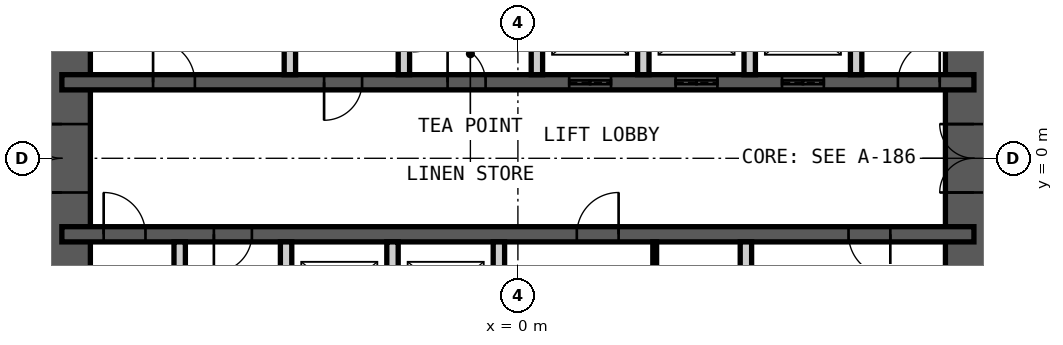
"""IFC4 building model, lengths in metres.
Left out: names, types, materials, properties, quantities, classifications, styles, units other than length and angle.
Written with IfcOpenShell. Run it as: python <this file> out.ifc"""

import sys

from ifc_helpers import new_model, si_unit, direction, frame, frame_2d, origin, place, context, subcontext, project, spatial, rectangle, extrude, element, fill, save


model = new_model("IFC4")
c1 = context("Model", 3, precision=1e-05, world=origin(), true_north=direction((0.0, 1.0)))
c2 = subcontext(c1, "Body", "Model", "MODEL_VIEW")
j1 = project(units=[si_unit("LENGTHUNIT", "METRE"), si_unit("PLANEANGLEUNIT", "RADIAN")], contexts=[c1])
p1 = place(None, origin())
s1 = spatial("IfcSite", under=j1, at=p1, CompositionType="ELEMENT")
p2 = place(p1, origin())
s2 = spatial("IfcBuilding", under=s1, at=p2, CompositionType="ELEMENT")
p3 = place(p2, frame((0.0, 0.0, 124.0)))
s3 = spatial("IfcBuildingStorey", under=s2, at=p3, CompositionType="ELEMENT", Elevation=124.0)
p4 = place(p3, frame((12.0, -9.0, 0.0), z_axis=(0.0, 0.0, 1.0), x_axis=(0.0, 1.0, 0.0)))
e1 = element("IfcWall", 1, at=p4, inside=s3, PredefinedType="SHEAR", context=c2, shape_type="SweptSolid", body=[
    extrude(rectangle(XDim=18.0, YDim=1.5, at=frame_2d((9.0, 0.0))), origin(), (0.0, 0.0, 1.0), 4.2),
])
p5 = place(p4, frame((8.1, 0.0, 0.0)))
e2 = element("IfcOpeningElement", 2, at=p5, cuts=e1, PredefinedType="OPENING", context=c2, shape_type="SweptSolid", body=[
    extrude(rectangle(XDim=1.8, YDim=2.1, at=frame_2d((0.9, 1.05))), frame((0.0, 0.76, 0.0), z_axis=(0.0, -1.0, 0.0), x_axis=(1.0, 0.0, 0.0)), (0.0, 0.0, 1.0), 1.52),
])
p6 = place(p3, frame((-12.0, -9.0, 0.0), z_axis=(0.0, 0.0, 1.0), x_axis=(0.0, 1.0, 0.0)))
e3 = element("IfcWall", 3, at=p6, inside=s3, PredefinedType="SHEAR", context=c2, shape_type="SweptSolid", body=[
    extrude(rectangle(XDim=18.0, YDim=1.5, at=frame_2d((9.0, 0.0))), origin(), (0.0, 0.0, 1.0), 4.2),
])
p7 = place(p6, frame((8.1, 0.0, 0.0)))
e4 = element("IfcOpeningElement", 4, at=p7, cuts=e3, PredefinedType="OPENING", context=c2, shape_type="SweptSolid", body=[
    extrude(rectangle(XDim=1.8, YDim=2.1, at=frame_2d((0.9, 1.05))), frame((0.0, 0.76, 0.0), z_axis=(0.0, -1.0, 0.0), x_axis=(1.0, 0.0, 0.0)), (0.0, 0.0, 1.0), 1.52),
])
p8 = place(p3, frame((-12.0, 2.0, 0.0), z_axis=(0.0, 0.0, 1.0), x_axis=(1.0, 0.0, 0.0)))
e5 = element("IfcWall", 5, at=p8, inside=s3, PredefinedType="SHEAR", context=c2, shape_type="SweptSolid", body=[
    extrude(rectangle(XDim=24.0, YDim=0.4, at=frame_2d((12.0, 0.0))), origin(), (0.0, 0.0, 1.0), 4.2),
])
p9 = place(p8, frame((2.4, 0.0, 0.0)))
e6 = element("IfcOpeningElement", 6, at=p9, cuts=e5, PredefinedType="OPENING", context=c2, shape_type="SweptSolid", body=[
    extrude(rectangle(XDim=1.1, YDim=2.1, at=frame_2d((0.55, 1.05))), frame((0.0, 0.21, 0.0), z_axis=(0.0, -1.0, 0.0), x_axis=(1.0, 0.0, 0.0)), (0.0, 0.0, 1.0), 0.42),
])
p10 = place(p8, frame((22.0, 0.0, 0.0)))
e7 = element("IfcOpeningElement", 7, at=p10, cuts=e5, PredefinedType="OPENING", context=c2, shape_type="SweptSolid", body=[
    extrude(rectangle(XDim=1.1, YDim=2.1, at=frame_2d((0.55, 1.05))), frame((0.0, 0.21, 0.0), z_axis=(0.0, -1.0, 0.0), x_axis=(1.0, 0.0, 0.0)), (0.0, 0.0, 1.0), 0.42),
])
p11 = place(p8, frame((10.15, 0.0, 0.0)))
e8 = element("IfcOpeningElement", 8, at=p11, cuts=e5, PredefinedType="OPENING", context=c2, shape_type="SweptSolid", body=[
    extrude(rectangle(XDim=1.0, YDim=2.1, at=frame_2d((0.5, 1.05))), frame((0.0, 0.21, 0.0), z_axis=(0.0, -1.0, 0.0), x_axis=(1.0, 0.0, 0.0)), (0.0, 0.0, 1.0), 0.42),
])
p12 = place(p8, frame((6.9, 0.0, 0.0)))
e9 = element("IfcOpeningElement", 9, at=p12, cuts=e5, PredefinedType="OPENING", context=c2, shape_type="SweptSolid", body=[
    extrude(rectangle(XDim=1.0, YDim=2.1, at=frame_2d((0.5, 1.05))), frame((0.0, 0.21, 0.0), z_axis=(0.0, -1.0, 0.0), x_axis=(1.0, 0.0, 0.0)), (0.0, 0.0, 1.0), 0.42),
])
p13 = place(p8, frame((13.35, 0.0, 0.0)))
e10 = element("IfcOpeningElement", 10, at=p13, cuts=e5, PredefinedType="OPENING", context=c2, shape_type="SweptSolid", body=[
    extrude(rectangle(XDim=1.1, YDim=2.4, at=frame_2d((0.55, 1.2))), frame((0.0, 0.21, 0.0), z_axis=(0.0, -1.0, 0.0), x_axis=(1.0, 0.0, 0.0)), (0.0, 0.0, 1.0), 0.42),
])
p14 = place(p8, frame((16.15, 0.0, 0.0)))
e11 = element("IfcOpeningElement", 11, at=p14, cuts=e5, PredefinedType="OPENING", context=c2, shape_type="SweptSolid", body=[
    extrude(rectangle(XDim=1.1, YDim=2.4, at=frame_2d((0.55, 1.2))), frame((0.0, 0.21, 0.0), z_axis=(0.0, -1.0, 0.0), x_axis=(1.0, 0.0, 0.0)), (0.0, 0.0, 1.0), 0.42),
])
p15 = place(p8, frame((18.95, 0.0, 0.0)))
e12 = element("IfcOpeningElement", 12, at=p15, cuts=e5, PredefinedType="OPENING", context=c2, shape_type="SweptSolid", body=[
    extrude(rectangle(XDim=1.1, YDim=2.4, at=frame_2d((0.55, 1.2))), frame((0.0, 0.21, 0.0), z_axis=(0.0, -1.0, 0.0), x_axis=(1.0, 0.0, 0.0)), (0.0, 0.0, 1.0), 0.42),
])
p16 = place(p3, frame((-12.0, -2.0, 0.0), z_axis=(0.0, 0.0, 1.0), x_axis=(1.0, 0.0, 0.0)))
e13 = element("IfcWall", 13, at=p16, inside=s3, PredefinedType="SHEAR", context=c2, shape_type="SweptSolid", body=[
    extrude(rectangle(XDim=24.0, YDim=0.4, at=frame_2d((12.0, 0.0))), origin(), (0.0, 0.0, 1.0), 4.2),
])
p17 = place(p16, frame((1.1, 0.0, 0.0)))
e14 = element("IfcOpeningElement", 14, at=p17, cuts=e13, PredefinedType="OPENING", context=c2, shape_type="SweptSolid", body=[
    extrude(rectangle(XDim=1.1, YDim=2.1, at=frame_2d((0.55, 1.05))), frame((0.0, 0.21, 0.0), z_axis=(0.0, -1.0, 0.0), x_axis=(1.0, 0.0, 0.0)), (0.0, 0.0, 1.0), 0.42),
])
p18 = place(p16, frame((13.55, 0.0, 0.0)))
e15 = element("IfcOpeningElement", 15, at=p18, cuts=e13, PredefinedType="OPENING", context=c2, shape_type="SweptSolid", body=[
    extrude(rectangle(XDim=1.1, YDim=2.1, at=frame_2d((0.55, 1.05))), frame((0.0, 0.21, 0.0), z_axis=(0.0, -1.0, 0.0), x_axis=(1.0, 0.0, 0.0)), (0.0, 0.0, 1.0), 0.42),
])
p19 = place(p16, frame((20.7, 0.0, 0.0)))
e16 = element("IfcOpeningElement", 16, at=p19, cuts=e13, PredefinedType="OPENING", context=c2, shape_type="SweptSolid", body=[
    extrude(rectangle(XDim=1.1, YDim=2.1, at=frame_2d((0.55, 1.05))), frame((0.0, 0.21, 0.0), z_axis=(0.0, -1.0, 0.0), x_axis=(1.0, 0.0, 0.0)), (0.0, 0.0, 1.0), 0.42),
])
p20 = place(p16, frame((4.0, 0.0, 0.0)))
e17 = element("IfcOpeningElement", 17, at=p20, cuts=e13, PredefinedType="OPENING", context=c2, shape_type="SweptSolid", body=[
    extrude(rectangle(XDim=1.0, YDim=2.1, at=frame_2d((0.5, 1.05))), frame((0.0, 0.21, 0.0), z_axis=(0.0, -1.0, 0.0), x_axis=(1.0, 0.0, 0.0)), (0.0, 0.0, 1.0), 0.42),
])
for number, where, z_axis, x_axis in (
    (18, (-6.0, 2.2, 0.0), (0.0, 0.0, 1.0), (0.0, 1.0, 0.0)),
    (19, (-3.0, 2.2, 0.0), (0.0, 0.0, 1.0), (0.0, 1.0, 0.0)),
    (20, (0.5, 2.2, 0.0), (0.0, 0.0, 1.0), (0.0, 1.0, 0.0)),
    (21, (3.3, 2.2, 0.0), (0.0, 0.0, 1.0), (0.0, 1.0, 0.0)),
    (22, (6.1, 2.2, 0.0), (0.0, 0.0, 1.0), (0.0, 1.0, 0.0)),
    (23, (8.9, 2.2, 0.0), (0.0, 0.0, 1.0), (0.0, 1.0, 0.0)),
    (24, (-8.9, -4.85, 0.0), (0.0, 0.0, 1.0), (0.0, 1.0, 0.0)),
    (25, (-6.1, -4.85, 0.0), (0.0, 0.0, 1.0), (0.0, 1.0, 0.0)),
    (26, (-3.3, -4.85, 0.0), (0.0, 0.0, 1.0), (0.0, 1.0, 0.0)),
    (27, (-0.5, -4.85, 0.0), (0.0, 0.0, 1.0), (0.0, 1.0, 0.0)),
    (28, (6.0, -4.85, 0.0), (0.0, 0.0, 1.0), (0.0, 1.0, 0.0)),
):
    element("IfcWall", number, at=place(p3, frame(where, z_axis=z_axis, x_axis=x_axis)), inside=s3, PredefinedType="PARTITIONING", context=c2, shape_type="SweptSolid", body=[
        extrude(rectangle(XDim=2.65, YDim=0.3, at=frame_2d((1.325, 0.0))), origin(), (0.0, 0.0, 1.0), 3.98),
    ])
p21 = place(p3, frame((3.6, -4.85, 0.0), z_axis=(0.0, 0.0, 1.0), x_axis=(0.0, 1.0, 0.0)))
e29 = element("IfcWall", 29, at=p21, inside=s3, PredefinedType="PARTITIONING", context=c2, shape_type="SweptSolid", body=[
    extrude(rectangle(XDim=2.65, YDim=0.1, at=frame_2d((1.325, 0.0))), origin(), (0.0, 0.0, 1.0), 3.98),
])
p22 = place(p21, frame((0.1, 0.0, 0.0)))
e30 = element("IfcOpeningElement", 30, at=p22, cuts=e29, PredefinedType="OPENING", context=c2, shape_type="SweptSolid", body=[
    extrude(rectangle(XDim=1.0, YDim=2.4, at=frame_2d((0.5, 1.2))), frame((0.0, 0.06, 0.0), z_axis=(0.0, -1.0, 0.0), x_axis=(1.0, 0.0, 0.0)), (0.0, 0.0, 1.0), 0.12),
])
p23 = place(p9, origin())
e31 = element("IfcDoor", 31, at=p23, inside=s3, OperationType="SINGLE_SWING_RIGHT", PredefinedType="DOOR", context=c2, shape_type="SweptSolid", body=[
    extrude(rectangle(XDim=1.1, YDim=2.1, at=frame_2d((0.55, 1.05))), frame((0.0, 0.025, 0.0), z_axis=(0.0, -1.0, 0.0), x_axis=(1.0, 0.0, 0.0)), (0.0, 0.0, 1.0), 0.05),
])
fill(e6, e31)
p24 = place(p17, origin())
e32 = element("IfcDoor", 32, at=p24, inside=s3, OperationType="SINGLE_SWING_RIGHT", PredefinedType="DOOR", context=c2, shape_type="SweptSolid", body=[
    extrude(rectangle(XDim=1.1, YDim=2.1, at=frame_2d((0.55, 1.05))), frame((0.0, 0.025, 0.0), z_axis=(0.0, -1.0, 0.0), x_axis=(1.0, 0.0, 0.0)), (0.0, 0.0, 1.0), 0.05),
])
fill(e14, e32)
p25 = place(p10, origin())
e33 = element("IfcDoor", 33, at=p25, inside=s3, OperationType="SINGLE_SWING_LEFT", PredefinedType="DOOR", context=c2, shape_type="SweptSolid", body=[
    extrude(rectangle(XDim=1.1, YDim=2.1, at=frame_2d((0.55, 1.05))), frame((0.0, 0.025, 0.0), z_axis=(0.0, -1.0, 0.0), x_axis=(1.0, 0.0, 0.0)), (0.0, 0.0, 1.0), 0.05),
])
fill(e7, e33)
p26 = place(p11, origin())
e34 = element("IfcDoor", 34, at=p26, inside=s3, OperationType="SINGLE_SWING_RIGHT", PredefinedType="DOOR", context=c2, shape_type="SweptSolid", body=[
    extrude(rectangle(XDim=1.0, YDim=2.1, at=frame_2d((0.5, 1.05))), frame((0.0, 0.025, 0.0), z_axis=(0.0, -1.0, 0.0), x_axis=(1.0, 0.0, 0.0)), (0.0, 0.0, 1.0), 0.05),
])
fill(e8, e34)
p27 = place(p18, origin())
e35 = element("IfcDoor", 35, at=p27, inside=s3, OperationType="SINGLE_SWING_LEFT", PredefinedType="DOOR", context=c2, shape_type="SweptSolid", body=[
    extrude(rectangle(XDim=1.1, YDim=2.1, at=frame_2d((0.55, 1.05))), frame((0.0, 0.025, 0.0), z_axis=(0.0, -1.0, 0.0), x_axis=(1.0, 0.0, 0.0)), (0.0, 0.0, 1.0), 0.05),
])
fill(e15, e35)
p28 = place(p19, origin())
e36 = element("IfcDoor", 36, at=p28, inside=s3, OperationType="SINGLE_SWING_RIGHT", PredefinedType="DOOR", context=c2, shape_type="SweptSolid", body=[
    extrude(rectangle(XDim=1.1, YDim=2.1, at=frame_2d((0.55, 1.05))), frame((0.0, 0.025, 0.0), z_axis=(0.0, -1.0, 0.0), x_axis=(1.0, 0.0, 0.0)), (0.0, 0.0, 1.0), 0.05),
])
fill(e16, e36)
p29 = place(p5, origin())
e37 = element("IfcDoor", 37, at=p29, inside=s3, OperationType="DOUBLE_DOOR_DOUBLE_SWING", PredefinedType="DOOR", context=c2, shape_type="SweptSolid", body=[
    extrude(rectangle(XDim=1.8, YDim=2.1, at=frame_2d((0.9, 1.05))), frame((0.0, 0.025, 0.0), z_axis=(0.0, -1.0, 0.0), x_axis=(1.0, 0.0, 0.0)), (0.0, 0.0, 1.0), 0.05),
])
fill(e2, e37)
p30 = place(p7, origin())
e38 = element("IfcDoor", 38, at=p30, inside=s3, OperationType="DOUBLE_DOOR_DOUBLE_SWING", PredefinedType="DOOR", context=c2, shape_type="SweptSolid", body=[
    extrude(rectangle(XDim=1.8, YDim=2.1, at=frame_2d((0.9, 1.05))), frame((0.0, 0.025, 0.0), z_axis=(0.0, -1.0, 0.0), x_axis=(1.0, 0.0, 0.0)), (0.0, 0.0, 1.0), 0.05),
])
fill(e4, e38)
p31 = place(p12, origin())
e39 = element("IfcDoor", 39, at=p31, inside=s3, OperationType="SINGLE_SWING_LEFT", PredefinedType="DOOR", context=c2, shape_type="SweptSolid", body=[
    extrude(rectangle(XDim=1.0, YDim=2.1, at=frame_2d((0.5, 1.05))), frame((0.0, 0.025, 0.0), z_axis=(0.0, -1.0, 0.0), x_axis=(1.0, 0.0, 0.0)), (0.0, 0.0, 1.0), 0.05),
])
fill(e9, e39)
p32 = place(p13, origin())
e40 = element("IfcDoor", 40, at=p32, inside=s3, OperationType="DOUBLE_DOOR_SLIDING", PredefinedType="DOOR", context=c2, shape_type="SweptSolid", body=[
    extrude(rectangle(XDim=1.1, YDim=2.4, at=frame_2d((0.55, 1.2))), frame((0.0, 0.025, 0.0), z_axis=(0.0, -1.0, 0.0), x_axis=(1.0, 0.0, 0.0)), (0.0, 0.0, 1.0), 0.05),
])
fill(e10, e40)
p33 = place(p14, origin())
e41 = element("IfcDoor", 41, at=p33, inside=s3, OperationType="DOUBLE_DOOR_SLIDING", PredefinedType="DOOR", context=c2, shape_type="SweptSolid", body=[
    extrude(rectangle(XDim=1.1, YDim=2.4, at=frame_2d((0.55, 1.2))), frame((0.0, 0.025, 0.0), z_axis=(0.0, -1.0, 0.0), x_axis=(1.0, 0.0, 0.0)), (0.0, 0.0, 1.0), 0.05),
])
fill(e11, e41)
p34 = place(p15, origin())
e42 = element("IfcDoor", 42, at=p34, inside=s3, OperationType="DOUBLE_DOOR_SLIDING", PredefinedType="DOOR", context=c2, shape_type="SweptSolid", body=[
    extrude(rectangle(XDim=1.1, YDim=2.4, at=frame_2d((0.55, 1.2))), frame((0.0, 0.025, 0.0), z_axis=(0.0, -1.0, 0.0), x_axis=(1.0, 0.0, 0.0)), (0.0, 0.0, 1.0), 0.05),
])
fill(e12, e42)
p35 = place(p20, origin())
e43 = element("IfcDoor", 43, at=p35, inside=s3, OperationType="SINGLE_SWING_LEFT", PredefinedType="DOOR", context=c2, shape_type="SweptSolid", body=[
    extrude(rectangle(XDim=1.0, YDim=2.1, at=frame_2d((0.5, 1.05))), frame((0.0, 0.025, 0.0), z_axis=(0.0, -1.0, 0.0), x_axis=(1.0, 0.0, 0.0)), (0.0, 0.0, 1.0), 0.05),
])
fill(e17, e43)
save(model, sys.argv[1])
